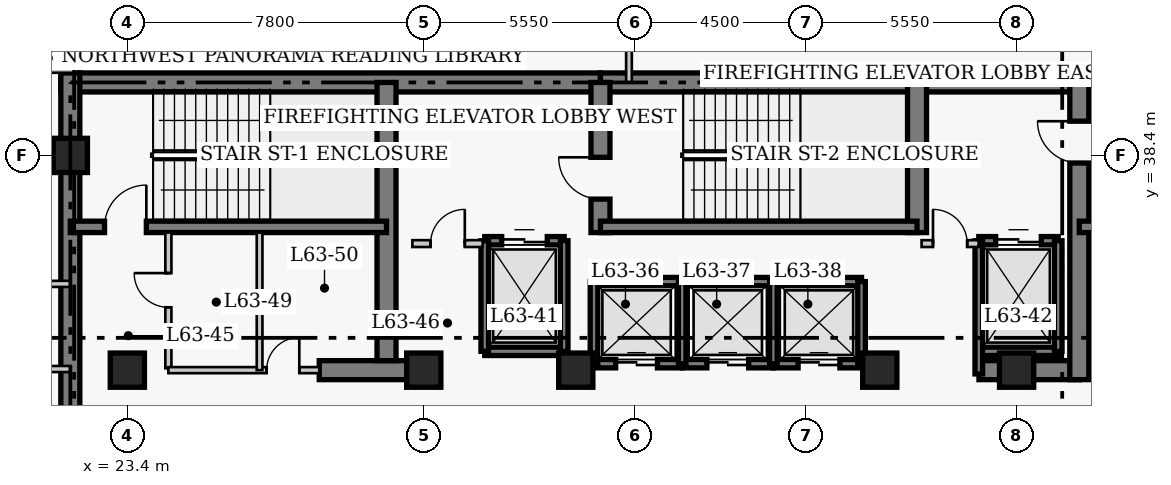
"""IFC4 building model, lengths in metres.
Left out: names, types, materials, properties, quantities, classifications, styles, units other than length and angle.
Written with IfcOpenShell. Run it as: python <this file> out.ifc"""

import sys

from ifc_helpers import new_model, si_unit, direction, frame, frame_2d, origin, origin_2d, place, context, subcontext, project, spatial, rectangle, extrude, element, fill, save


model = new_model("IFC4")
c1 = context("Model", 3, precision=1e-05, world=origin(), true_north=direction((0.0, 1.0)))
c2 = subcontext(c1, "Body", "Model", "MODEL_VIEW")
j1 = project(units=[si_unit("LENGTHUNIT", "METRE"), si_unit("PLANEANGLEUNIT", "RADIAN")], contexts=[c1])
p1 = place(None, origin())
s1 = spatial("IfcSite", under=j1, at=p1, CompositionType="ELEMENT")
p2 = place(p1, origin())
s2 = spatial("IfcBuilding", under=s1, at=p2, CompositionType="ELEMENT")
p3 = place(p2, frame((0.0, 0.0, 253.4)))
s3 = spatial("IfcBuildingStorey", under=s2, at=p3, CompositionType="ELEMENT", Elevation=253.4)
p4 = place(p3, frame((21.65, 40.32, 0.0), z_axis=(0.0, 0.0, 1.0), x_axis=(1.0, 0.0, 0.0)))
e1 = element("IfcWall", 1, at=p4, inside=s3, PredefinedType="SHEAR", context=c2, shape_type="SweptSolid", body=[
    extrude(rectangle(XDim=14.2, YDim=0.5, at=frame_2d((7.1, 0.0))), origin(), (0.0, 0.0, 1.0), 4.0),
])
p5 = place(p3, frame((35.85, 40.32, 0.0), z_axis=(0.0, 0.0, 1.0), x_axis=(1.0, 0.0, 0.0)))
e2 = element("IfcWall", 2, at=p5, inside=s3, PredefinedType="SHEAR", context=c2, shape_type="SweptSolid", body=[
    extrude(rectangle(XDim=12.6, YDim=0.5, at=frame_2d((6.3, 0.0))), origin(), (0.0, 0.0, 1.0), 4.0),
])
p6 = place(p3, frame((48.45, 40.32, 0.0), z_axis=(0.0, 0.0, 1.0), x_axis=(1.0, 0.0, 0.0)))
e3 = element("IfcWall", 3, at=p6, inside=s3, PredefinedType="SHEAR", context=c2, shape_type="SweptSolid", body=[
    extrude(rectangle(XDim=8.57, YDim=0.5, at=frame_2d((4.285, 0.0))), origin(), (0.0, 0.0, 1.0), 4.0),
])
p7 = place(p3, frame((21.9, 27.05, 0.0), z_axis=(0.0, 0.0, 1.0), x_axis=(0.0, 1.0, 0.0)))
e4 = element("IfcWall", 4, at=p7, inside=s3, PredefinedType="SHEAR", context=c2, shape_type="SweptSolid", body=[
    extrude(rectangle(XDim=13.52, YDim=0.5, at=frame_2d((6.76, 0.0))), origin(), (0.0, 0.0, 1.0), 4.0),
])
p8 = place(p3, frame((28.45, 32.75, 0.0), z_axis=(0.0, 0.0, 1.0), x_axis=(1.0, 0.0, 0.0)))
e5 = element("IfcWall", 5, at=p8, inside=s3, PredefinedType="SHEAR", context=c2, shape_type="SweptSolid", body=[
    extrude(rectangle(XDim=2.4, YDim=0.5, at=frame_2d((1.2, 0.0))), origin(), (0.0, 0.0, 1.0), 4.0),
])
p9 = place(p3, frame((45.81, 32.75, 0.0), z_axis=(0.0, 0.0, 1.0), x_axis=(1.0, 0.0, 0.0)))
e6 = element("IfcWall", 6, at=p9, inside=s3, PredefinedType="SHEAR", context=c2, shape_type="SweptSolid", body=[
    extrude(rectangle(XDim=2.64, YDim=0.5, at=frame_2d((1.32, 0.0))), origin(), (0.0, 0.0, 1.0), 4.0),
])
p10 = place(p3, frame((30.22, 33.0, 0.0), z_axis=(0.0, 0.0, 1.0), x_axis=(0.0, 1.0, 0.0)))
e7 = element("IfcWall", 7, at=p10, inside=s3, PredefinedType="SHEAR", context=c2, shape_type="SweptSolid", body=[
    extrude(rectangle(XDim=7.32, YDim=0.5, at=frame_2d((3.66, 0.0))), origin(), (0.0, 0.0, 1.0), 4.0),
])
p11 = place(p3, frame((35.85, 36.37, 0.0), z_axis=(0.0, 0.0, 1.0), x_axis=(0.0, 1.0, 0.0)))
e8 = element("IfcWall", 8, at=p11, inside=s3, PredefinedType="SHEAR", context=c2, shape_type="SweptSolid", body=[
    extrude(rectangle(XDim=3.95, YDim=0.5, at=frame_2d((1.975, 0.0))), origin(), (0.0, 0.0, 1.0), 4.0),
])
p12 = place(p11, frame((0.88, 0.0, 0.0)))
e9 = element("IfcOpeningElement", 9, at=p12, cuts=e8, PredefinedType="OPENING", context=c2, shape_type="SweptSolid", body=[
    extrude(rectangle(XDim=1.1, YDim=2.15, at=frame_2d((0.55, 1.075))), frame((0.0, 0.26, 0.0), z_axis=(0.0, -1.0, 0.0), x_axis=(1.0, 0.0, 0.0)), (0.0, 0.0, 1.0), 0.52),
])
p13 = place(p3, frame((44.18, 36.37, 0.0), z_axis=(0.0, 0.0, 1.0), x_axis=(0.0, 1.0, 0.0)))
e10 = element("IfcWall", 10, at=p13, inside=s3, PredefinedType="SHEAR", context=c2, shape_type="SweptSolid", body=[
    extrude(rectangle(XDim=3.95, YDim=0.5, at=frame_2d((1.975, 0.0))), origin(), (0.0, 0.0, 1.0), 4.0),
])
p14 = place(p3, frame((48.45, 32.5, 0.0), z_axis=(0.0, 0.0, 1.0), x_axis=(0.0, 1.0, 0.0)))
e11 = element("IfcWall", 11, at=p14, inside=s3, PredefinedType="SHEAR", context=c2, shape_type="SweptSolid", body=[
    extrude(rectangle(XDim=7.82, YDim=0.5, at=frame_2d((3.91, 0.0))), origin(), (0.0, 0.0, 1.0), 4.0),
])
p15 = place(p14, frame((5.7, 0.0, 0.0)))
e12 = element("IfcOpeningElement", 12, at=p15, cuts=e11, PredefinedType="OPENING", context=c2, shape_type="SweptSolid", body=[
    extrude(rectangle(XDim=1.1, YDim=2.15, at=frame_2d((0.55, 1.075))), frame((0.0, 0.26, 0.0), z_axis=(0.0, -1.0, 0.0), x_axis=(1.0, 0.0, 0.0)), (0.0, 0.0, 1.0), 0.52),
])
p16 = place(p3, frame((21.9, 36.52, 0.0), z_axis=(0.0, 0.0, 1.0), x_axis=(1.0, 0.0, 0.0)))
e13 = element("IfcWall", 13, at=p16, inside=s3, PredefinedType="SHEAR", context=c2, shape_type="SweptSolid", body=[
    extrude(rectangle(XDim=8.32, YDim=0.3, at=frame_2d((4.16, 0.0))), origin(), (0.0, 0.0, 1.0), 4.0),
])
p17 = place(p16, frame((0.9, 0.0, 0.0)))
e14 = element("IfcOpeningElement", 14, at=p17, cuts=e13, PredefinedType="OPENING", context=c2, shape_type="SweptSolid", body=[
    extrude(rectangle(XDim=1.1, YDim=2.15, at=frame_2d((0.55, 1.075))), frame((0.0, 0.16, 0.0), z_axis=(0.0, -1.0, 0.0), x_axis=(1.0, 0.0, 0.0)), (0.0, 0.0, 1.0), 0.32),
])
p18 = place(p3, frame((35.85, 36.52, 0.0), z_axis=(0.0, 0.0, 1.0), x_axis=(1.0, 0.0, 0.0)))
e15 = element("IfcWall", 15, at=p18, inside=s3, PredefinedType="SHEAR", context=c2, shape_type="SweptSolid", body=[
    extrude(rectangle(XDim=8.33, YDim=0.3, at=frame_2d((4.165, 0.0))), origin(), (0.0, 0.0, 1.0), 4.0),
])
p19 = place(p3, frame((48.45, 36.52, 0.0), z_axis=(0.0, 0.0, 1.0), x_axis=(1.0, 0.0, 0.0)))
e16 = element("IfcWall", 16, at=p19, inside=s3, PredefinedType="SHEAR", context=c2, shape_type="SweptSolid", body=[
    extrude(rectangle(XDim=8.32, YDim=0.3, at=frame_2d((4.16, 0.0))), origin(), (0.0, 0.0, 1.0), 4.0),
])
for number, where, z_axis, x_axis in (
    (17, (21.9, 38.4, 0.0), (0.0, 0.0, 1.0), (1.0, 0.0, 0.0)),
    (18, (23.4, 32.75, 0.0), (0.0, 0.0, 1.0), (1.0, 0.0, 0.0)),
    (19, (31.2, 32.75, 0.0), (0.0, 0.0, 1.0), (1.0, 0.0, 0.0)),
    (20, (35.2, 32.75, 0.0), (0.0, 0.0, 1.0), (1.0, 0.0, 0.0)),
    (21, (43.2, 32.75, 0.0), (0.0, 0.0, 1.0), (1.0, 0.0, 0.0)),
    (22, (46.8, 32.75, 0.0), (0.0, 0.0, 1.0), (1.0, 0.0, 0.0)),
):
    element("IfcColumn", number, at=place(p3, frame(where, z_axis=z_axis, x_axis=x_axis)), inside=s3, PredefinedType="COLUMN", context=c2, shape_type="SweptSolid", body=[
        extrude(rectangle(XDim=0.9, YDim=0.9, at=origin_2d()), origin(), (0.0, 0.0, 1.0), 4.0),
    ])
p20 = place(p3, frame((35.68, 35.08, 0.0), z_axis=(0.0, 0.0, 1.0), x_axis=(1.0, 0.0, 0.0)))
e23 = element("IfcWall", 23, at=p20, inside=s3, PredefinedType="SHEAR", context=c2, shape_type="SweptSolid", body=[
    extrude(rectangle(XDim=2.32, YDim=0.22, at=frame_2d((1.16, 0.0))), origin(), (0.0, 0.0, 1.0), 4.0),
])
p21 = place(p3, frame((35.68, 32.92, 0.0), z_axis=(0.0, 0.0, 1.0), x_axis=(1.0, 0.0, 0.0)))
e24 = element("IfcWall", 24, at=p21, inside=s3, PredefinedType="SHEAR", context=c2, shape_type="SweptSolid", body=[
    extrude(rectangle(XDim=2.32, YDim=0.22, at=frame_2d((1.16, 0.0))), origin(), (0.0, 0.0, 1.0), 4.0),
])
p22 = place(p21, frame((0.57, 0.0, 0.0)))
e25 = element("IfcOpeningElement", 25, at=p22, cuts=e24, PredefinedType="OPENING", context=c2, shape_type="SweptSolid", body=[
    extrude(rectangle(XDim=1.1, YDim=2.15, at=frame_2d((0.55, 1.075))), frame((0.0, 0.12, 0.0), z_axis=(0.0, -1.0, 0.0), x_axis=(1.0, 0.0, 0.0)), (0.0, 0.0, 1.0), 0.24),
])
p23 = place(p3, frame((35.68, 32.92, 0.0), z_axis=(0.0, 0.0, 1.0), x_axis=(0.0, 1.0, 0.0)))
e26 = element("IfcWall", 26, at=p23, inside=s3, PredefinedType="SHEAR", context=c2, shape_type="SweptSolid", body=[
    extrude(rectangle(XDim=2.16, YDim=0.2, at=frame_2d((1.08, 0.0))), origin(), (0.0, 0.0, 1.0), 4.0),
])
p24 = place(p3, frame((38.0, 35.08, 0.0), z_axis=(0.0, 0.0, 1.0), x_axis=(1.0, 0.0, 0.0)))
e27 = element("IfcWall", 27, at=p24, inside=s3, PredefinedType="SHEAR", context=c2, shape_type="SweptSolid", body=[
    extrude(rectangle(XDim=2.4, YDim=0.22, at=frame_2d((1.2, 0.0))), origin(), (0.0, 0.0, 1.0), 4.0),
])
p25 = place(p3, frame((38.0, 32.92, 0.0), z_axis=(0.0, 0.0, 1.0), x_axis=(1.0, 0.0, 0.0)))
e28 = element("IfcWall", 28, at=p25, inside=s3, PredefinedType="SHEAR", context=c2, shape_type="SweptSolid", body=[
    extrude(rectangle(XDim=2.4, YDim=0.22, at=frame_2d((1.2, 0.0))), origin(), (0.0, 0.0, 1.0), 4.0),
])
p26 = place(p25, frame((0.65, 0.0, 0.0)))
e29 = element("IfcOpeningElement", 29, at=p26, cuts=e28, PredefinedType="OPENING", context=c2, shape_type="SweptSolid", body=[
    extrude(rectangle(XDim=1.1, YDim=2.15, at=frame_2d((0.55, 1.075))), frame((0.0, 0.12, 0.0), z_axis=(0.0, -1.0, 0.0), x_axis=(1.0, 0.0, 0.0)), (0.0, 0.0, 1.0), 0.24),
])
p27 = place(p3, frame((38.0, 32.92, 0.0), z_axis=(0.0, 0.0, 1.0), x_axis=(0.0, 1.0, 0.0)))
e30 = element("IfcWall", 30, at=p27, inside=s3, PredefinedType="SHEAR", context=c2, shape_type="SweptSolid", body=[
    extrude(rectangle(XDim=2.16, YDim=0.2, at=frame_2d((1.08, 0.0))), origin(), (0.0, 0.0, 1.0), 4.0),
])
p28 = place(p3, frame((40.4, 35.08, 0.0), z_axis=(0.0, 0.0, 1.0), x_axis=(1.0, 0.0, 0.0)))
e31 = element("IfcWall", 31, at=p28, inside=s3, PredefinedType="SHEAR", context=c2, shape_type="SweptSolid", body=[
    extrude(rectangle(XDim=2.32, YDim=0.22, at=frame_2d((1.16, 0.0))), origin(), (0.0, 0.0, 1.0), 4.0),
])
p29 = place(p3, frame((40.4, 32.92, 0.0), z_axis=(0.0, 0.0, 1.0), x_axis=(1.0, 0.0, 0.0)))
e32 = element("IfcWall", 32, at=p29, inside=s3, PredefinedType="SHEAR", context=c2, shape_type="SweptSolid", body=[
    extrude(rectangle(XDim=2.32, YDim=0.22, at=frame_2d((1.16, 0.0))), origin(), (0.0, 0.0, 1.0), 4.0),
])
p30 = place(p29, frame((0.65, 0.0, 0.0)))
e33 = element("IfcOpeningElement", 33, at=p30, cuts=e32, PredefinedType="OPENING", context=c2, shape_type="SweptSolid", body=[
    extrude(rectangle(XDim=1.1, YDim=2.15, at=frame_2d((0.55, 1.075))), frame((0.0, 0.12, 0.0), z_axis=(0.0, -1.0, 0.0), x_axis=(1.0, 0.0, 0.0)), (0.0, 0.0, 1.0), 0.24),
])
for number, where, z_axis, x_axis in (
    (34, (40.4, 32.92, 0.0), (0.0, 0.0, 1.0), (0.0, 1.0, 0.0)),
    (35, (42.72, 32.92, 0.0), (0.0, 0.0, 1.0), (0.0, 1.0, 0.0)),
):
    element("IfcWall", number, at=place(p3, frame(where, z_axis=z_axis, x_axis=x_axis)), inside=s3, PredefinedType="SHEAR", context=c2, shape_type="SweptSolid", body=[
        extrude(rectangle(XDim=2.16, YDim=0.2, at=frame_2d((1.08, 0.0))), origin(), (0.0, 0.0, 1.0), 4.0),
    ])
p31 = place(p3, frame((32.805, 36.155, 0.0), z_axis=(0.0, 0.0, 1.0), x_axis=(1.0, 0.0, 0.0)))
e36 = element("IfcWall", 36, at=p31, inside=s3, PredefinedType="SHEAR", context=c2, shape_type="SweptSolid", body=[
    extrude(rectangle(XDim=2.09, YDim=0.22, at=frame_2d((1.045, 0.0))), origin(), (0.0, 0.0, 1.0), 4.0),
])
p32 = place(p31, frame((0.445, 0.0, 0.0)))
e37 = element("IfcOpeningElement", 37, at=p32, cuts=e36, PredefinedType="OPENING", context=c2, shape_type="SweptSolid", body=[
    extrude(rectangle(XDim=1.2, YDim=2.15, at=frame_2d((0.6, 1.075))), frame((0.0, 0.12, 0.0), z_axis=(0.0, -1.0, 0.0), x_axis=(1.0, 0.0, 0.0)), (0.0, 0.0, 1.0), 0.24),
])
p33 = place(p3, frame((32.805, 33.245, 0.0), z_axis=(0.0, 0.0, 1.0), x_axis=(1.0, 0.0, 0.0)))
e38 = element("IfcWall", 38, at=p33, inside=s3, PredefinedType="SHEAR", context=c2, shape_type="SweptSolid", body=[
    extrude(rectangle(XDim=2.09, YDim=0.22, at=frame_2d((1.045, 0.0))), origin(), (0.0, 0.0, 1.0), 4.0),
])
for number, where, z_axis, x_axis in (
    (39, (32.805, 33.245, 0.0), (0.0, 0.0, 1.0), (0.0, 1.0, 0.0)),
    (40, (34.895, 33.245, 0.0), (0.0, 0.0, 1.0), (0.0, 1.0, 0.0)),
):
    element("IfcWall", number, at=place(p3, frame(where, z_axis=z_axis, x_axis=x_axis)), inside=s3, PredefinedType="SHEAR", context=c2, shape_type="SweptSolid", body=[
        extrude(rectangle(XDim=2.91, YDim=0.2, at=frame_2d((1.455, 0.0))), origin(), (0.0, 0.0, 1.0), 4.0),
    ])
p34 = place(p3, frame((45.805, 36.155, 0.0), z_axis=(0.0, 0.0, 1.0), x_axis=(1.0, 0.0, 0.0)))
e41 = element("IfcWall", 41, at=p34, inside=s3, PredefinedType="SHEAR", context=c2, shape_type="SweptSolid", body=[
    extrude(rectangle(XDim=2.09, YDim=0.22, at=frame_2d((1.045, 0.0))), origin(), (0.0, 0.0, 1.0), 4.0),
])
p35 = place(p34, frame((0.445, 0.0, 0.0)))
e42 = element("IfcOpeningElement", 42, at=p35, cuts=e41, PredefinedType="OPENING", context=c2, shape_type="SweptSolid", body=[
    extrude(rectangle(XDim=1.2, YDim=2.15, at=frame_2d((0.6, 1.075))), frame((0.0, 0.12, 0.0), z_axis=(0.0, -1.0, 0.0), x_axis=(1.0, 0.0, 0.0)), (0.0, 0.0, 1.0), 0.24),
])
p36 = place(p3, frame((45.805, 33.245, 0.0), z_axis=(0.0, 0.0, 1.0), x_axis=(1.0, 0.0, 0.0)))
e43 = element("IfcWall", 43, at=p36, inside=s3, PredefinedType="SHEAR", context=c2, shape_type="SweptSolid", body=[
    extrude(rectangle(XDim=2.09, YDim=0.22, at=frame_2d((1.045, 0.0))), origin(), (0.0, 0.0, 1.0), 4.0),
])
p37 = place(p3, frame((45.805, 32.65, 0.0), z_axis=(0.0, 0.0, 1.0), x_axis=(0.0, 1.0, 0.0)))
e44 = element("IfcWall", 44, at=p37, inside=s3, PredefinedType="SHEAR", context=c2, shape_type="SweptSolid", body=[
    extrude(rectangle(XDim=3.505, YDim=0.2, at=frame_2d((1.752, 0.0))), origin(), (0.0, 0.0, 1.0), 4.0),
])
p38 = place(p3, frame((47.895, 33.245, 0.0), z_axis=(0.0, 0.0, 1.0), x_axis=(0.0, 1.0, 0.0)))
e45 = element("IfcWall", 45, at=p38, inside=s3, PredefinedType="SHEAR", context=c2, shape_type="SweptSolid", body=[
    extrude(rectangle(XDim=2.91, YDim=0.2, at=frame_2d((1.455, 0.0))), origin(), (0.0, 0.0, 1.0), 4.0),
])
p39 = place(p3, frame((30.9, 36.08, 0.0), z_axis=(0.0, 0.0, 1.0), x_axis=(1.0, 0.0, 0.0)))
e46 = element("IfcWall", 46, at=p39, inside=s3, PredefinedType="PARTITIONING", context=c2, shape_type="SweptSolid", body=[
    extrude(rectangle(XDim=1.85, YDim=0.18, at=frame_2d((0.925, 0.0))), origin(), (0.0, 0.0, 1.0), 3.76),
])
p40 = place(p39, frame((0.48, 0.0, 0.0)))
e47 = element("IfcOpeningElement", 47, at=p40, cuts=e46, PredefinedType="OPENING", context=c2, shape_type="SweptSolid", body=[
    extrude(rectangle(XDim=0.9, YDim=2.15, at=frame_2d((0.45, 1.075))), frame((0.0, 0.1, 0.0), z_axis=(0.0, -1.0, 0.0), x_axis=(1.0, 0.0, 0.0)), (0.0, 0.0, 1.0), 0.2),
])
p41 = place(p3, frame((44.3, 36.08, 0.0), z_axis=(0.0, 0.0, 1.0), x_axis=(1.0, 0.0, 0.0)))
e48 = element("IfcWall", 48, at=p41, inside=s3, PredefinedType="PARTITIONING", context=c2, shape_type="SweptSolid", body=[
    extrude(rectangle(XDim=1.5, YDim=0.18, at=frame_2d((0.75, 0.0))), origin(), (0.0, 0.0, 1.0), 3.76),
])
p42 = place(p41, frame((0.3, 0.0, 0.0)))
e49 = element("IfcOpeningElement", 49, at=p42, cuts=e48, PredefinedType="OPENING", context=c2, shape_type="SweptSolid", body=[
    extrude(rectangle(XDim=0.9, YDim=2.15, at=frame_2d((0.45, 1.075))), frame((0.0, 0.1, 0.0), z_axis=(0.0, -1.0, 0.0), x_axis=(1.0, 0.0, 0.0)), (0.0, 0.0, 1.0), 0.2),
])
p43 = place(p3, frame((24.48, 32.8, 0.0), z_axis=(0.0, 0.0, 1.0), x_axis=(0.0, 1.0, 0.0)))
e50 = element("IfcWall", 50, at=p43, inside=s3, PredefinedType="PARTITIONING", context=c2, shape_type="SweptSolid", body=[
    extrude(rectangle(XDim=3.57, YDim=0.16, at=frame_2d((1.785, 0.0))), origin(), (0.0, 0.0, 1.0), 3.76),
])
p44 = place(p43, frame((1.604, 0.0, 0.0)))
e51 = element("IfcOpeningElement", 51, at=p44, cuts=e50, PredefinedType="OPENING", context=c2, shape_type="SweptSolid", body=[
    extrude(rectangle(XDim=0.9, YDim=2.1, at=frame_2d((0.45, 1.05))), frame((0.0, 0.09, 0.0), z_axis=(0.0, -1.0, 0.0), x_axis=(1.0, 0.0, 0.0)), (0.0, 0.0, 1.0), 0.18),
])
p45 = place(p3, frame((24.48, 32.75, 0.0), z_axis=(0.0, 0.0, 1.0), x_axis=(1.0, 0.0, 0.0)))
e52 = element("IfcWall", 52, at=p45, inside=s3, PredefinedType="PARTITIONING", context=c2, shape_type="SweptSolid", body=[
    extrude(rectangle(XDim=3.97, YDim=0.16, at=frame_2d((1.985, 0.0))), origin(), (0.0, 0.0, 1.0), 3.76),
])
p46 = place(p45, frame((2.585, 0.0, 0.0)))
e53 = element("IfcOpeningElement", 53, at=p46, cuts=e52, PredefinedType="OPENING", context=c2, shape_type="SweptSolid", body=[
    extrude(rectangle(XDim=0.86, YDim=2.05, at=frame_2d((0.43, 1.025))), frame((0.0, 0.09, 0.0), z_axis=(0.0, -1.0, 0.0), x_axis=(1.0, 0.0, 0.0)), (0.0, 0.0, 1.0), 0.18),
])
p47 = place(p3, frame((26.88, 32.75, 0.0), z_axis=(0.0, 0.0, 1.0), x_axis=(0.0, 1.0, 0.0)))
e54 = element("IfcWall", 54, at=p47, inside=s3, PredefinedType="PARTITIONING", context=c2, shape_type="SweptSolid", body=[
    extrude(rectangle(XDim=3.62, YDim=0.15, at=frame_2d((1.81, 0.0))), origin(), (0.0, 0.0, 1.0), 3.76),
])
for number, where, z_axis, x_axis in (
    (55, (19.96, 35.02, 0.0), (0.0, 0.0, 1.0), (1.0, 0.0, 0.0)),
    (56, (19.96, 32.78, 0.0), (0.0, 0.0, 1.0), (1.0, 0.0, 0.0)),
):
    element("IfcWall", number, at=place(p3, frame(where, z_axis=z_axis, x_axis=x_axis)), inside=s3, PredefinedType="PARTITIONING", context=c2, shape_type="SweptSolid", body=[
        extrude(rectangle(XDim=1.94, YDim=0.16, at=frame_2d((0.97, 0.0))), origin(), (0.0, 0.0, 1.0), 3.76),
    ])
p48 = place(p3, frame((17.74, 40.65, 0.0), z_axis=(0.0, 0.0, 1.0), x_axis=(1.0, 0.0, 0.0)))
e57 = element("IfcWall", 57, at=p48, inside=s3, PredefinedType="PARTITIONING", context=c2, shape_type="SweptSolid", body=[
    extrude(rectangle(XDim=4.36, YDim=0.15, at=frame_2d((2.18, 0.0))), origin(), (0.0, 0.0, 1.0), 3.76),
])
p49 = place(p48, frame((0.55, 0.0, 0.0)))
e58 = element("IfcOpeningElement", 58, at=p49, cuts=e57, PredefinedType="OPENING", context=c2, shape_type="SweptSolid", body=[
    extrude(rectangle(XDim=1.0, YDim=2.15, at=frame_2d((0.5, 1.075))), frame((0.0, 0.085, 0.0), z_axis=(0.0, -1.0, 0.0), x_axis=(1.0, 0.0, 0.0)), (0.0, 0.0, 1.0), 0.17),
])
p50 = place(p3, frame((36.6, 40.32, 0.0), z_axis=(0.0, 0.0, 1.0), x_axis=(0.0, 1.0, 0.0)))
e59 = element("IfcWall", 59, at=p50, inside=s3, PredefinedType="PARTITIONING", context=c2, shape_type="SweptSolid", body=[
    extrude(rectangle(XDim=3.545, YDim=0.15, at=frame_2d((1.772, 0.0))), origin(), (0.0, 0.0, 1.0), 3.76),
])
p51 = place(p22, origin())
e60 = element("IfcDoor", 60, at=p51, inside=s3, OperationType="DOUBLE_DOOR_SLIDING", PredefinedType="DOOR", context=c2, shape_type="SweptSolid", body=[
    extrude(rectangle(XDim=1.1, YDim=2.15, at=frame_2d((0.55, 1.075))), frame((0.0, 0.025, 0.0), z_axis=(0.0, -1.0, 0.0), x_axis=(1.0, 0.0, 0.0)), (0.0, 0.0, 1.0), 0.05),
])
fill(e25, e60)
p52 = place(p26, origin())
e61 = element("IfcDoor", 61, at=p52, inside=s3, OperationType="DOUBLE_DOOR_SLIDING", PredefinedType="DOOR", context=c2, shape_type="SweptSolid", body=[
    extrude(rectangle(XDim=1.1, YDim=2.15, at=frame_2d((0.55, 1.075))), frame((0.0, 0.025, 0.0), z_axis=(0.0, -1.0, 0.0), x_axis=(1.0, 0.0, 0.0)), (0.0, 0.0, 1.0), 0.05),
])
fill(e29, e61)
p53 = place(p30, origin())
e62 = element("IfcDoor", 62, at=p53, inside=s3, OperationType="DOUBLE_DOOR_SLIDING", PredefinedType="DOOR", context=c2, shape_type="SweptSolid", body=[
    extrude(rectangle(XDim=1.1, YDim=2.15, at=frame_2d((0.55, 1.075))), frame((0.0, 0.025, 0.0), z_axis=(0.0, -1.0, 0.0), x_axis=(1.0, 0.0, 0.0)), (0.0, 0.0, 1.0), 0.05),
])
fill(e33, e62)
p54 = place(p32, origin())
e63 = element("IfcDoor", 63, at=p54, inside=s3, OperationType="DOUBLE_DOOR_SLIDING", PredefinedType="DOOR", context=c2, shape_type="SweptSolid", body=[
    extrude(rectangle(XDim=1.2, YDim=2.15, at=frame_2d((0.6, 1.075))), frame((0.0, 0.025, 0.0), z_axis=(0.0, -1.0, 0.0), x_axis=(1.0, 0.0, 0.0)), (0.0, 0.0, 1.0), 0.05),
])
fill(e37, e63)
p55 = place(p35, origin())
e64 = element("IfcDoor", 64, at=p55, inside=s3, OperationType="DOUBLE_DOOR_SLIDING", PredefinedType="DOOR", context=c2, shape_type="SweptSolid", body=[
    extrude(rectangle(XDim=1.2, YDim=2.15, at=frame_2d((0.6, 1.075))), frame((0.0, 0.025, 0.0), z_axis=(0.0, -1.0, 0.0), x_axis=(1.0, 0.0, 0.0)), (0.0, 0.0, 1.0), 0.05),
])
fill(e42, e64)
p56 = place(p40, origin())
e65 = element("IfcDoor", 65, at=p56, inside=s3, OperationType="SINGLE_SWING_RIGHT", PredefinedType="DOOR", context=c2, shape_type="SweptSolid", body=[
    extrude(rectangle(XDim=0.9, YDim=2.15, at=frame_2d((0.45, 1.075))), frame((0.0, 0.025, 0.0), z_axis=(0.0, -1.0, 0.0), x_axis=(1.0, 0.0, 0.0)), (0.0, 0.0, 1.0), 0.05),
])
fill(e47, e65)
p57 = place(p42, origin())
e66 = element("IfcDoor", 66, at=p57, inside=s3, OperationType="SINGLE_SWING_LEFT", PredefinedType="DOOR", context=c2, shape_type="SweptSolid", body=[
    extrude(rectangle(XDim=0.9, YDim=2.15, at=frame_2d((0.45, 1.075))), frame((0.0, 0.025, 0.0), z_axis=(0.0, -1.0, 0.0), x_axis=(1.0, 0.0, 0.0)), (0.0, 0.0, 1.0), 0.05),
])
fill(e49, e66)
p58 = place(p44, origin())
e67 = element("IfcDoor", 67, at=p58, inside=s3, OperationType="SINGLE_SWING_RIGHT", PredefinedType="DOOR", context=c2, shape_type="SweptSolid", body=[
    extrude(rectangle(XDim=0.9, YDim=2.1, at=frame_2d((0.45, 1.05))), frame((0.0, 0.025, 0.0), z_axis=(0.0, -1.0, 0.0), x_axis=(1.0, 0.0, 0.0)), (0.0, 0.0, 1.0), 0.05),
])
fill(e51, e67)
p59 = place(p46, origin())
e68 = element("IfcDoor", 68, at=p59, inside=s3, OperationType="SINGLE_SWING_RIGHT", PredefinedType="DOOR", context=c2, shape_type="SweptSolid", body=[
    extrude(rectangle(XDim=0.86, YDim=2.05, at=frame_2d((0.43, 1.025))), frame((0.0, 0.025, 0.0), z_axis=(0.0, -1.0, 0.0), x_axis=(1.0, 0.0, 0.0)), (0.0, 0.0, 1.0), 0.05),
])
fill(e53, e68)
p60 = place(p17, origin())
e69 = element("IfcDoor", 69, at=p60, inside=s3, OperationType="SINGLE_SWING_RIGHT", PredefinedType="DOOR", context=c2, shape_type="SweptSolid", body=[
    extrude(rectangle(XDim=1.1, YDim=2.15, at=frame_2d((0.55, 1.075))), frame((0.0, 0.025, 0.0), z_axis=(0.0, -1.0, 0.0), x_axis=(1.0, 0.0, 0.0)), (0.0, 0.0, 1.0), 0.05),
])
fill(e14, e69)
p61 = place(p12, origin())
e70 = element("IfcDoor", 70, at=p61, inside=s3, OperationType="SINGLE_SWING_RIGHT", PredefinedType="DOOR", context=c2, shape_type="SweptSolid", body=[
    extrude(rectangle(XDim=1.1, YDim=2.15, at=frame_2d((0.55, 1.075))), frame((0.0, 0.025, 0.0), z_axis=(0.0, -1.0, 0.0), x_axis=(1.0, 0.0, 0.0)), (0.0, 0.0, 1.0), 0.05),
])
fill(e9, e70)
p62 = place(p15, origin())
e71 = element("IfcDoor", 71, at=p62, inside=s3, OperationType="SINGLE_SWING_RIGHT", PredefinedType="DOOR", context=c2, shape_type="SweptSolid", body=[
    extrude(rectangle(XDim=1.1, YDim=2.15, at=frame_2d((0.55, 1.075))), frame((0.0, 0.025, 0.0), z_axis=(0.0, -1.0, 0.0), x_axis=(1.0, 0.0, 0.0)), (0.0, 0.0, 1.0), 0.05),
])
fill(e12, e71)
save(model, sys.argv[1])
